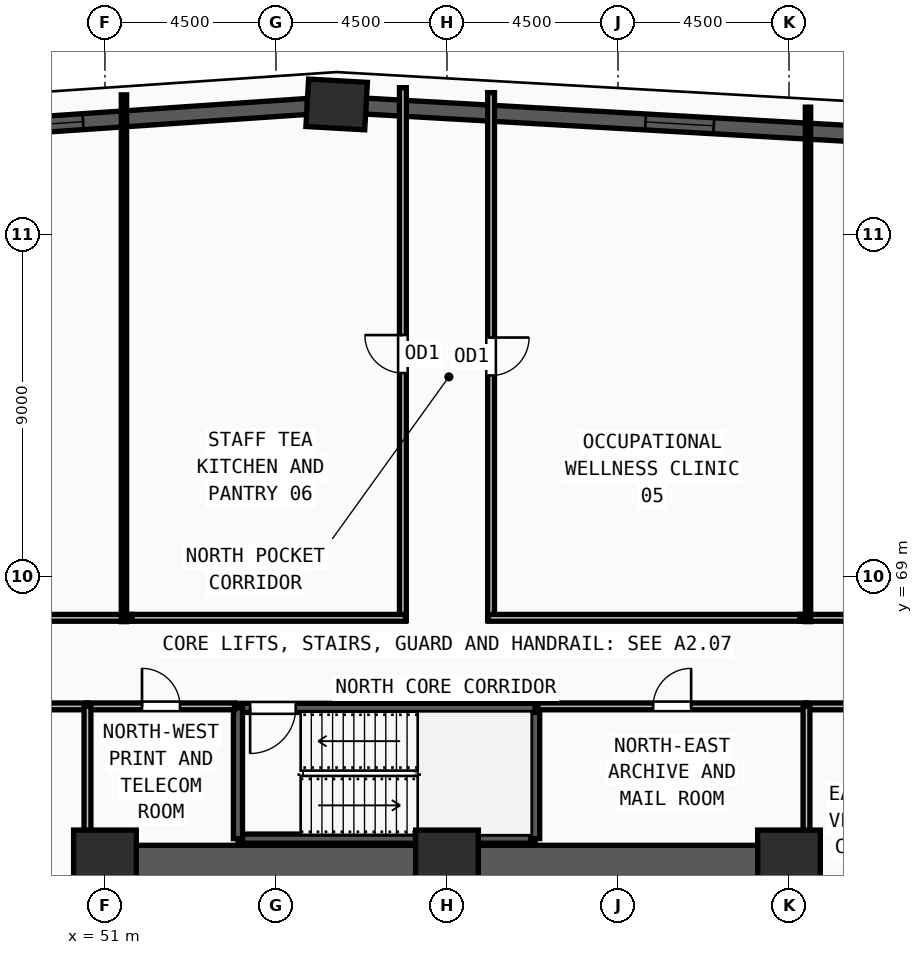
"""IFC4 building model, lengths in metres.
Left out: names, types, materials, properties, quantities, classifications, styles, units other than length and angle.
Written with IfcOpenShell. Run it as: python <this file> out.ifc"""

import sys

from ifc_helpers import new_model, si_unit, direction, frame, frame_2d, origin, origin_2d, place, context, subcontext, project, spatial, rectangle, extrude, source, transform, mapped, element, fill, save


model = new_model("IFC4")
c1 = context("Model", 3, precision=1e-05, world=origin(), true_north=direction((0.0, 1.0)))
c2 = subcontext(c1, "Body", "Model", "MODEL_VIEW")
j1 = project(units=[si_unit("LENGTHUNIT", "METRE"), si_unit("PLANEANGLEUNIT", "RADIAN")], contexts=[c1])
p1 = place(None, origin())
s1 = spatial("IfcSite", under=j1, at=p1, CompositionType="ELEMENT")
p2 = place(p1, origin())
s2 = spatial("IfcBuilding", under=s1, at=p2, CompositionType="ELEMENT")
p3 = place(p2, frame((0.0, 0.0, 74.25)))
s3 = spatial("IfcBuildingStorey", under=s2, at=p3, CompositionType="ELEMENT", Elevation=74.25)
m1 = source(origin(), c2, "Body", "SweptSolid", [
    extrude(rectangle(XDim=1.65, YDim=1.65, at=origin_2d()), origin(), (0.0, 0.0, 1.0), 3.75),
])
for number, where, z_axis, x_axis in (
    (1, (69.0, 61.5, 0.0), (0.0, 0.0, 1.0), (1.0, 0.0, 0.0)),
    (2, (60.0, 61.5, 0.0), (0.0, 0.0, 1.0), (1.0, 0.0, 0.0)),
    (3, (51.0, 61.5, 0.0), (0.0, 0.0, 1.0), (1.0, 0.0, 0.0)),
):
    element("IfcColumn", number, at=place(p3, frame(where, z_axis=z_axis, x_axis=x_axis)), inside=s3, PredefinedType="COLUMN", context=c2, shape_type="MappedRepresentation", body=[
        mapped(m1, transform((0.0, 0.0, 0.0), x_axis=(1.0, 0.0, 0.0), y_axis=(0.0, 1.0, 0.0), z_axis=(0.0, 0.0, 1.0), scale=1.0)),
    ])
m2 = source(origin(), c2, "Body", "SweptSolid", [
    extrude(rectangle(XDim=1.55, YDim=1.25, at=origin_2d()), origin(), (0.0, 0.0, 1.0), 3.75),
])
p4 = place(p3, frame((57.097, 81.418, 0.0), z_axis=(0.0, 0.0, 1.0), x_axis=(-0.998401550109, 0.056518534482, 0.0)))
e4 = element("IfcColumn", 4, at=p4, inside=s3, PredefinedType="COLUMN", context=c2, shape_type="MappedRepresentation", body=[
    mapped(m2, transform((0.0, 0.0, 0.0), x_axis=(1.0, 0.0, 0.0), y_axis=(0.0, 1.0, 0.0), z_axis=(0.0, 0.0, 1.0), scale=1.0)),
])
p5 = place(p3, frame((90.902, 79.503, 0.0), z_axis=(0.0, 0.0, 1.0), x_axis=(-0.998398734181, 0.056568255998, 0.0)))
e5 = element("IfcWall", 5, at=p5, inside=s3, PredefinedType="SOLIDWALL", context=c2, shape_type="SweptSolid", body=[
    extrude(rectangle(XDim=33.094, YDim=0.42, at=frame_2d((16.547, 0.0))), origin(), (0.0, 0.0, 1.0), 3.57),
])
m3 = source(origin(), c2, "Body", "SweptSolid", [
    extrude(rectangle(XDim=1.8, YDim=1.95, at=frame_2d((0.9, 0.975))), frame((0.0, 0.22, 0.0), z_axis=(0.0, -1.0, 0.0), x_axis=(1.0, 0.0, 0.0)), (0.0, 0.0, 1.0), 0.44),
])
p6 = place(p5, frame((7.373, 0.0, 0.55)))
e6 = element("IfcOpeningElement", 6, at=p6, cuts=e5, PredefinedType="OPENING", context=c2, shape_type="MappedRepresentation", body=[
    mapped(m3, transform((0.0, 0.0, 0.0), x_axis=(1.0, 0.0, 0.0), y_axis=(0.0, 1.0, 0.0), z_axis=(0.0, 0.0, 1.0), scale=1.0)),
])
p7 = place(p5, frame((15.647, 0.0, 0.55)))
e7 = element("IfcOpeningElement", 7, at=p7, cuts=e5, PredefinedType="OPENING", context=c2, shape_type="MappedRepresentation", body=[
    mapped(m3, transform((0.0, 0.0, 0.0), x_axis=(1.0, 0.0, 0.0), y_axis=(0.0, 1.0, 0.0), z_axis=(0.0, 0.0, 1.0), scale=1.0)),
])
p8 = place(p5, frame((23.92, 0.0, 0.55)))
e8 = element("IfcOpeningElement", 8, at=p8, cuts=e5, PredefinedType="OPENING", context=c2, shape_type="MappedRepresentation", body=[
    mapped(m3, transform((0.0, 0.0, 0.0), x_axis=(1.0, 0.0, 0.0), y_axis=(0.0, 1.0, 0.0), z_axis=(0.0, 0.0, 1.0), scale=1.0)),
])
p9 = place(p3, frame((56.334, 81.366, 0.0), z_axis=(0.0, 0.0, 1.0), x_axis=(-0.997708484566, -0.067659292233, 0.0)))
e9 = element("IfcWall", 9, at=p9, inside=s3, PredefinedType="SOLIDWALL", context=c2, shape_type="SweptSolid", body=[
    extrude(rectangle(XDim=27.297, YDim=0.42, at=frame_2d((13.649, 0.0))), origin(), (0.0, 0.0, 1.0), 3.57),
])
p10 = place(p9, frame((5.924, 0.0, 0.55)))
e10 = element("IfcOpeningElement", 10, at=p10, cuts=e9, PredefinedType="OPENING", context=c2, shape_type="MappedRepresentation", body=[
    mapped(m3, transform((0.0, 0.0, 0.0), x_axis=(1.0, 0.0, 0.0), y_axis=(0.0, 1.0, 0.0), z_axis=(0.0, 0.0, 1.0), scale=1.0)),
])
p11 = place(p9, frame((12.749, 0.0, 0.55)))
e11 = element("IfcOpeningElement", 11, at=p11, cuts=e9, PredefinedType="OPENING", context=c2, shape_type="MappedRepresentation", body=[
    mapped(m3, transform((0.0, 0.0, 0.0), x_axis=(1.0, 0.0, 0.0), y_axis=(0.0, 1.0, 0.0), z_axis=(0.0, 0.0, 1.0), scale=1.0)),
])
p12 = place(p9, frame((19.573, 0.0, 0.55)))
e12 = element("IfcOpeningElement", 12, at=p12, cuts=e9, PredefinedType="OPENING", context=c2, shape_type="MappedRepresentation", body=[
    mapped(m3, transform((0.0, 0.0, 0.0), x_axis=(1.0, 0.0, 0.0), y_axis=(0.0, 1.0, 0.0), z_axis=(0.0, 0.0, 1.0), scale=1.0)),
])
for number, where, z_axis, x_axis in (
    (13, (51.825, 61.5, 0.0), (0.0, 0.0, 1.0), (1.0, 0.0, 0.0)),
    (14, (60.825, 61.5, 0.0), (0.0, 0.0, 1.0), (1.0, 0.0, 0.0)),
):
    element("IfcWall", number, at=place(p3, frame(where, z_axis=z_axis, x_axis=x_axis)), inside=s3, PredefinedType="SHEAR", context=c2, shape_type="SweptSolid", body=[
        extrude(rectangle(XDim=7.35, YDim=0.85, at=frame_2d((3.675, 0.0))), origin(), (0.0, 0.0, 1.0), 3.57),
    ])
p13 = place(p3, frame((54.5, 62.1, 0.0), z_axis=(0.0, 0.0, 1.0), x_axis=(1.0, 0.0, 0.0)))
e15 = element("IfcWall", 15, at=p13, inside=s3, PredefinedType="SOLIDWALL", context=c2, shape_type="SweptSolid", body=[
    extrude(rectangle(XDim=7.82, YDim=0.24, at=frame_2d((3.91, 0.0))), origin(), (0.0, 0.0, 1.0), 3.57),
])
p14 = place(p3, frame((62.32, 62.1, 0.0), z_axis=(0.0, 0.0, 1.0), x_axis=(0.0, 1.0, 0.0)))
e16 = element("IfcWall", 16, at=p14, inside=s3, PredefinedType="SOLIDWALL", context=c2, shape_type="SweptSolid", body=[
    extrude(rectangle(XDim=3.44, YDim=0.24, at=frame_2d((1.72, 0.0))), origin(), (0.0, 0.0, 1.0), 3.57),
])
p15 = place(p3, frame((62.32, 65.54, 0.0), z_axis=(0.0, 0.0, 1.0), x_axis=(-1.0, 0.0, 0.0)))
e17 = element("IfcWall", 17, at=p15, inside=s3, PredefinedType="SOLIDWALL", context=c2, shape_type="SweptSolid", body=[
    extrude(rectangle(XDim=7.82, YDim=0.24, at=frame_2d((3.91, 0.0))), origin(), (0.0, 0.0, 1.0), 3.57),
])
m4 = source(origin(), c2, "Body", "SweptSolid", [
    extrude(rectangle(XDim=1.2, YDim=2.2, at=frame_2d((0.6, 1.1))), frame((0.0, 0.13, 0.0), z_axis=(0.0, -1.0, 0.0), x_axis=(1.0, 0.0, 0.0)), (0.0, 0.0, 1.0), 0.26),
])
p16 = place(p15, frame((6.3, 0.0, 0.0)))
e18 = element("IfcOpeningElement", 18, at=p16, cuts=e17, PredefinedType="OPENING", context=c2, shape_type="MappedRepresentation", body=[
    mapped(m4, transform((0.0, 0.0, 0.0), x_axis=(1.0, 0.0, 0.0), y_axis=(0.0, 1.0, 0.0), z_axis=(0.0, 0.0, 1.0), scale=1.0)),
])
p17 = place(p3, frame((54.5, 65.54, 0.0), z_axis=(0.0, 0.0, 1.0), x_axis=(0.0, -1.0, 0.0)))
e19 = element("IfcWall", 19, at=p17, inside=s3, PredefinedType="SOLIDWALL", context=c2, shape_type="SweptSolid", body=[
    extrude(rectangle(XDim=3.44, YDim=0.24, at=frame_2d((1.72, 0.0))), origin(), (0.0, 0.0, 1.0), 3.57),
])
p18 = place(p3, frame((50.54, 65.58, 0.0), z_axis=(0.0, 0.0, 1.0), x_axis=(1.0, 0.0, 0.0)))
e20 = element("IfcWall", 20, at=p18, inside=s3, PredefinedType="PARTITIONING", context=c2, shape_type="SweptSolid", body=[
    extrude(rectangle(XDim=3.87, YDim=0.18, at=frame_2d((1.935, 0.0))), origin(), (0.0, 0.0, 1.0), 3.57),
])
m5 = source(origin(), c2, "Body", "SweptSolid", [
    extrude(rectangle(XDim=1.0, YDim=2.2, at=frame_2d((0.5, 1.1))), frame((0.0, 0.1, 0.0), z_axis=(0.0, -1.0, 0.0), x_axis=(1.0, 0.0, 0.0)), (0.0, 0.0, 1.0), 0.2),
])
p19 = place(p18, frame((1.435, 0.0, 0.0)))
e21 = element("IfcOpeningElement", 21, at=p19, cuts=e20, PredefinedType="OPENING", context=c2, shape_type="MappedRepresentation", body=[
    mapped(m5, transform((0.0, 0.0, 0.0), x_axis=(1.0, 0.0, 0.0), y_axis=(0.0, 1.0, 0.0), z_axis=(0.0, 0.0, 1.0), scale=1.0)),
])
p20 = place(p3, frame((62.39, 65.58, 0.0), z_axis=(0.0, 0.0, 1.0), x_axis=(1.0, 0.0, 0.0)))
e22 = element("IfcWall", 22, at=p20, inside=s3, PredefinedType="PARTITIONING", context=c2, shape_type="SweptSolid", body=[
    extrude(rectangle(XDim=7.07, YDim=0.18, at=frame_2d((3.535, 0.0))), origin(), (0.0, 0.0, 1.0), 3.57),
])
p21 = place(p20, frame((3.035, 0.0, 0.0)))
e23 = element("IfcOpeningElement", 23, at=p21, cuts=e22, PredefinedType="OPENING", context=c2, shape_type="MappedRepresentation", body=[
    mapped(m5, transform((0.0, 0.0, 0.0), x_axis=(1.0, 0.0, 0.0), y_axis=(0.0, 1.0, 0.0), z_axis=(0.0, 0.0, 1.0), scale=1.0)),
])
p22 = place(p3, frame((46.7, 65.58, 0.0), z_axis=(0.0, 0.0, 1.0), x_axis=(1.0, 0.0, 0.0)))
e24 = element("IfcWall", 24, at=p22, inside=s3, PredefinedType="PARTITIONING", context=c2, shape_type="SweptSolid", body=[
    extrude(rectangle(XDim=3.84, YDim=0.18, at=frame_2d((1.92, 0.0))), origin(), (0.0, 0.0, 1.0), 3.57),
])
m6 = source(origin(), c2, "Body", "SweptSolid", [
    extrude(rectangle(XDim=1.3, YDim=2.2, at=frame_2d((0.65, 1.1))), frame((0.0, 0.1, 0.0), z_axis=(0.0, -1.0, 0.0), x_axis=(1.0, 0.0, 0.0)), (0.0, 0.0, 1.0), 0.2),
])
p23 = place(p22, frame((1.27, 0.0, 0.0)))
e25 = element("IfcOpeningElement", 25, at=p23, cuts=e24, PredefinedType="OPENING", context=c2, shape_type="MappedRepresentation", body=[
    mapped(m6, transform((0.0, 0.0, 0.0), x_axis=(1.0, 0.0, 0.0), y_axis=(0.0, 1.0, 0.0), z_axis=(0.0, 0.0, 1.0), scale=1.0)),
])
p24 = place(p3, frame((69.46, 65.58, 0.0), z_axis=(0.0, 0.0, 1.0), x_axis=(1.0, 0.0, 0.0)))
e26 = element("IfcWall", 26, at=p24, inside=s3, PredefinedType="PARTITIONING", context=c2, shape_type="SweptSolid", body=[
    extrude(rectangle(XDim=3.84, YDim=0.18, at=frame_2d((1.92, 0.0))), origin(), (0.0, 0.0, 1.0), 3.57),
])
p25 = place(p24, frame((1.27, 0.0, 0.0)))
e27 = element("IfcOpeningElement", 27, at=p25, cuts=e26, PredefinedType="OPENING", context=c2, shape_type="MappedRepresentation", body=[
    mapped(m6, transform((0.0, 0.0, 0.0), x_axis=(1.0, 0.0, 0.0), y_axis=(0.0, 1.0, 0.0), z_axis=(0.0, 0.0, 1.0), scale=1.0)),
])
p26 = place(p3, frame((69.285, 67.91, 0.0), z_axis=(0.0, 0.0, 1.0), x_axis=(1.0, 0.0, 0.0)))
e28 = element("IfcWall", 28, at=p26, inside=s3, PredefinedType="PARTITIONING", context=c2, shape_type="SweptSolid", body=[
    extrude(rectangle(XDim=6.345, YDim=0.18, at=frame_2d((3.172, 0.0))), origin(), (0.0, 0.0, 1.0), 3.57),
])
m7 = source(origin(), c2, "Body", "SweptSolid", [
    extrude(rectangle(XDim=1.5, YDim=2.2, at=frame_2d((0.75, 1.1))), frame((0.0, 0.1, 0.0), z_axis=(0.0, -1.0, 0.0), x_axis=(1.0, 0.0, 0.0)), (0.0, 0.0, 1.0), 0.2),
])
p27 = place(p26, frame((2.422, 0.0, 0.0)))
e29 = element("IfcOpeningElement", 29, at=p27, cuts=e28, PredefinedType="OPENING", context=c2, shape_type="MappedRepresentation", body=[
    mapped(m7, transform((0.0, 0.0, 0.0), x_axis=(1.0, 0.0, 0.0), y_axis=(0.0, 1.0, 0.0), z_axis=(0.0, 0.0, 1.0), scale=1.0)),
])
p28 = place(p3, frame((61.16, 81.729, 0.0), z_axis=(0.0, 0.0, 1.0), x_axis=(0.0, -1.0, 0.0)))
e30 = element("IfcWall", 30, at=p28, inside=s3, PredefinedType="PARTITIONING", context=c2, shape_type="SweptSolid", body=[
    extrude(rectangle(XDim=13.889, YDim=0.18, at=frame_2d((6.944, 0.0))), origin(), (0.0, 0.0, 1.0), 3.57),
])
p29 = place(p28, frame((6.444, 0.0, 0.0)))
e31 = element("IfcOpeningElement", 31, at=p29, cuts=e30, PredefinedType="OPENING", context=c2, shape_type="MappedRepresentation", body=[
    mapped(m5, transform((0.0, 0.0, 0.0), x_axis=(1.0, 0.0, 0.0), y_axis=(0.0, 1.0, 0.0), z_axis=(0.0, 0.0, 1.0), scale=1.0)),
])
p30 = place(p3, frame((58.84, 67.84, 0.0), z_axis=(0.0, 0.0, 1.0), x_axis=(0.0, 1.0, 0.0)))
e32 = element("IfcWall", 32, at=p30, inside=s3, PredefinedType="PARTITIONING", context=c2, shape_type="SweptSolid", body=[
    extrude(rectangle(XDim=14.02, YDim=0.18, at=frame_2d((7.01, 0.0))), origin(), (0.0, 0.0, 1.0), 3.57),
])
p31 = place(p30, frame((6.51, 0.0, 0.0)))
e33 = element("IfcOpeningElement", 33, at=p31, cuts=e32, PredefinedType="OPENING", context=c2, shape_type="MappedRepresentation", body=[
    mapped(m5, transform((0.0, 0.0, 0.0), x_axis=(1.0, 0.0, 0.0), y_axis=(0.0, 1.0, 0.0), z_axis=(0.0, 0.0, 1.0), scale=1.0)),
])
p32 = place(p3, frame((44.37, 67.91, 0.0), z_axis=(0.0, 0.0, 1.0), x_axis=(1.0, 0.0, 0.0)))
e34 = element("IfcWall", 34, at=p32, inside=s3, PredefinedType="PARTITIONING", context=c2, shape_type="SweptSolid", body=[
    extrude(rectangle(XDim=7.345, YDim=0.18, at=frame_2d((3.672, 0.0))), origin(), (0.0, 0.0, 1.0), 3.57),
])
p33 = place(p32, frame((2.923, 0.0, 0.0)))
e35 = element("IfcOpeningElement", 35, at=p33, cuts=e34, PredefinedType="OPENING", context=c2, shape_type="MappedRepresentation", body=[
    mapped(m7, transform((0.0, 0.0, 0.0), x_axis=(1.0, 0.0, 0.0), y_axis=(0.0, 1.0, 0.0), z_axis=(0.0, 0.0, 1.0), scale=1.0)),
])
for number, where, z_axis, x_axis in (
    (36, (50.54, 61.95, 0.0), (0.0, 0.0, 1.0), (0.0, 1.0, 0.0)),
    (37, (69.46, 61.95, 0.0), (0.0, 0.0, 1.0), (0.0, 1.0, 0.0)),
):
    element("IfcWall", number, at=place(p3, frame(where, z_axis=z_axis, x_axis=x_axis)), inside=s3, PredefinedType="PARTITIONING", context=c2, shape_type="SweptSolid", body=[
        extrude(rectangle(XDim=3.63, YDim=0.18, at=frame_2d((1.815, 0.0))), origin(), (0.0, 0.0, 1.0), 3.57),
    ])
p34 = place(p3, frame((61.09, 67.91, 0.0), z_axis=(0.0, 0.0, 1.0), x_axis=(1.0, 0.0, 0.0)))
e38 = element("IfcWall", 38, at=p34, inside=s3, PredefinedType="PARTITIONING", context=c2, shape_type="SweptSolid", body=[
    extrude(rectangle(XDim=8.195, YDim=0.18, at=frame_2d((4.097, 0.0))), origin(), (0.0, 0.0, 1.0), 3.57),
])
p35 = place(p3, frame((51.715, 67.91, 0.0), z_axis=(0.0, 0.0, 1.0), x_axis=(1.0, 0.0, 0.0)))
e39 = element("IfcWall", 39, at=p35, inside=s3, PredefinedType="PARTITIONING", context=c2, shape_type="SweptSolid", body=[
    extrude(rectangle(XDim=7.195, YDim=0.18, at=frame_2d((3.597, 0.0))), origin(), (0.0, 0.0, 1.0), 3.57),
])
p36 = place(p3, frame((51.5, 67.81, 0.0), z_axis=(0.0, 0.0, 1.0), x_axis=(0.0, 1.0, 0.0)))
e40 = element("IfcWall", 40, at=p36, inside=s3, PredefinedType="PARTITIONING", context=c2, shape_type="SweptSolid", body=[
    extrude(rectangle(XDim=13.86, YDim=0.14, at=frame_2d((6.93, 0.0))), origin(), (0.0, 0.0, 1.0), 3.57),
])
p37 = place(p3, frame((69.5, 67.81, 0.0), z_axis=(0.0, 0.0, 1.0), x_axis=(0.0, 1.0, 0.0)))
e41 = element("IfcWall", 41, at=p37, inside=s3, PredefinedType="PARTITIONING", context=c2, shape_type="SweptSolid", body=[
    extrude(rectangle(XDim=13.537, YDim=0.14, at=frame_2d((6.769, 0.0))), origin(), (0.0, 0.0, 1.0), 3.57),
])
m8 = source(origin(), c2, "Body", "SweptSolid", [
    extrude(rectangle(XDim=1.8, YDim=1.95, at=frame_2d((0.9, 0.975))), frame((0.0, 0.03, 0.0), z_axis=(0.0, -1.0, 0.0), x_axis=(1.0, 0.0, 0.0)), (0.0, 0.0, 1.0), 0.06),
])
p38 = place(p8, origin())
e42 = element("IfcWindow", 42, at=p38, inside=s3, PartitioningType="DOUBLE_PANEL_VERTICAL", PredefinedType="WINDOW", context=c2, shape_type="MappedRepresentation", body=[
    mapped(m8, transform((0.0, 0.0, 0.0), x_axis=(1.0, 0.0, 0.0), y_axis=(0.0, 1.0, 0.0), z_axis=(0.0, 0.0, 1.0), scale=1.0)),
])
fill(e8, e42)
p39 = place(p10, origin())
e43 = element("IfcWindow", 43, at=p39, inside=s3, PartitioningType="DOUBLE_PANEL_VERTICAL", PredefinedType="WINDOW", context=c2, shape_type="MappedRepresentation", body=[
    mapped(m8, transform((0.0, 0.0, 0.0), x_axis=(1.0, 0.0, 0.0), y_axis=(0.0, 1.0, 0.0), z_axis=(0.0, 0.0, 1.0), scale=1.0)),
])
fill(e10, e43)
m9 = source(origin(), c2, "Body", "SweptSolid", [
    extrude(rectangle(XDim=1.2, YDim=2.2, at=frame_2d((0.6, 1.1))), frame((0.0, 0.025, 0.0), z_axis=(0.0, -1.0, 0.0), x_axis=(1.0, 0.0, 0.0)), (0.0, 0.0, 1.0), 0.05),
])
p40 = place(p16, origin())
e44 = element("IfcDoor", 44, at=p40, inside=s3, OperationType="SINGLE_SWING_RIGHT", PredefinedType="DOOR", context=c2, shape_type="MappedRepresentation", body=[
    mapped(m9, transform((0.0, 0.0, 0.0), x_axis=(1.0, 0.0, 0.0), y_axis=(0.0, 1.0, 0.0), z_axis=(0.0, 0.0, 1.0), scale=1.0)),
])
fill(e18, e44)
m10 = source(origin(), c2, "Body", "SweptSolid", [
    extrude(rectangle(XDim=1.0, YDim=2.2, at=frame_2d((0.5, 1.1))), frame((0.0, 0.025, 0.0), z_axis=(0.0, -1.0, 0.0), x_axis=(1.0, 0.0, 0.0)), (0.0, 0.0, 1.0), 0.05),
])
p41 = place(p19, origin())
e45 = element("IfcDoor", 45, at=p41, inside=s3, OperationType="SINGLE_SWING_LEFT", PredefinedType="DOOR", context=c2, shape_type="MappedRepresentation", body=[
    mapped(m10, transform((0.0, 0.0, 0.0), x_axis=(1.0, 0.0, 0.0), y_axis=(0.0, 1.0, 0.0), z_axis=(0.0, 0.0, 1.0), scale=1.0)),
])
fill(e21, e45)
p42 = place(p21, origin())
e46 = element("IfcDoor", 46, at=p42, inside=s3, OperationType="SINGLE_SWING_RIGHT", PredefinedType="DOOR", context=c2, shape_type="MappedRepresentation", body=[
    mapped(m10, transform((0.0, 0.0, 0.0), x_axis=(1.0, 0.0, 0.0), y_axis=(0.0, 1.0, 0.0), z_axis=(0.0, 0.0, 1.0), scale=1.0)),
])
fill(e23, e46)
p43 = place(p29, origin())
e47 = element("IfcDoor", 47, at=p43, inside=s3, OperationType="SINGLE_SWING_LEFT", PredefinedType="DOOR", context=c2, shape_type="MappedRepresentation", body=[
    mapped(m10, transform((0.0, 0.0, 0.0), x_axis=(1.0, 0.0, 0.0), y_axis=(0.0, 1.0, 0.0), z_axis=(0.0, 0.0, 1.0), scale=1.0)),
])
fill(e31, e47)
p44 = place(p31, origin())
e48 = element("IfcDoor", 48, at=p44, inside=s3, OperationType="SINGLE_SWING_RIGHT", PredefinedType="DOOR", context=c2, shape_type="MappedRepresentation", body=[
    mapped(m10, transform((0.0, 0.0, 0.0), x_axis=(1.0, 0.0, 0.0), y_axis=(0.0, 1.0, 0.0), z_axis=(0.0, 0.0, 1.0), scale=1.0)),
])
fill(e33, e48)
save(model, sys.argv[1])
